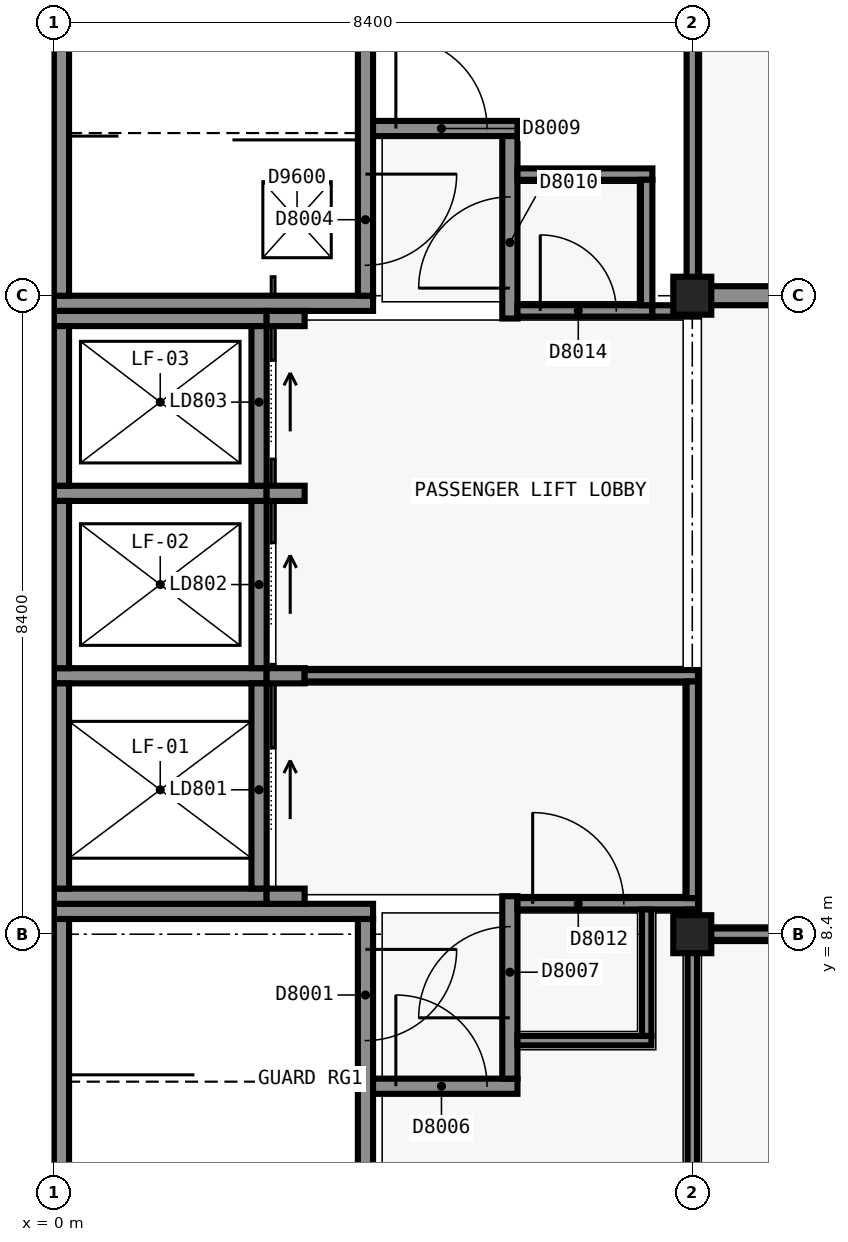
"""IFC4 building model, lengths in metres.
Left out: names, types, materials, properties, quantities, classifications, styles, units other than length and angle.
Written with IfcOpenShell. Run it as: python <this file> out.ifc"""

import sys

from ifc_helpers import new_model, si_unit, direction, frame, frame_2d, origin, origin_2d, place, context, subcontext, project, spatial, rectangle, extrude, element, fill, save


model = new_model("IFC4")
c1 = context("Model", 3, precision=1e-05, world=origin(), true_north=direction((0.0, 1.0)))
c2 = subcontext(c1, "Body", "Model", "MODEL_VIEW")
j1 = project(units=[si_unit("LENGTHUNIT", "METRE"), si_unit("PLANEANGLEUNIT", "RADIAN")], contexts=[c1])
p1 = place(None, origin())
s1 = spatial("IfcSite", under=j1, at=p1, CompositionType="ELEMENT")
p2 = place(p1, origin())
s2 = spatial("IfcBuilding", under=s1, at=p2, CompositionType="ELEMENT")
p3 = place(p2, frame((0.0, 0.0, 38.1)))
s3 = spatial("IfcBuildingStorey", under=s2, at=p3, CompositionType="ELEMENT", Elevation=38.1)
p4 = place(p3, frame((0.0, 8.7, 0.0), z_axis=(0.0, 0.0, 1.0), x_axis=(1.0, 0.0, 0.0)))
e1 = element("IfcWall", 1, at=p4, inside=s3, PredefinedType="SHEAR", context=c2, shape_type="SweptSolid", body=[
    extrude(rectangle(XDim=4.199, YDim=0.2, at=frame_2d((2.1, 0.0))), origin(), (0.0, 0.0, 1.0), 4.5),
])
p5 = place(p3, frame((0.1, 0.2, 0.0), z_axis=(0.0, 0.0, 1.0), x_axis=(0.0, 1.0, 0.0)))
e2 = element("IfcWall", 2, at=p5, inside=s3, PredefinedType="SHEAR", context=c2, shape_type="SweptSolid", body=[
    extrude(rectangle(XDim=8.4, YDim=0.2, at=frame_2d((4.2, 0.0))), origin(), (0.0, 0.0, 1.0), 4.5),
])
p6 = place(p3, frame((4.1, 8.6, 0.0), z_axis=(0.0, 0.0, 1.0), x_axis=(0.0, -1.0, 0.0)))
e3 = element("IfcWall", 3, at=p6, inside=s3, PredefinedType="SHEAR", context=c2, shape_type="SweptSolid", body=[
    extrude(rectangle(XDim=8.4, YDim=0.2, at=frame_2d((4.2, 0.0))), origin(), (0.0, 0.0, 1.0), 4.5),
])
p7 = place(p6, frame((0.4, 0.0, 0.0)))
e4 = element("IfcOpeningElement", 4, at=p7, cuts=e3, PredefinedType="OPENING", context=c2, shape_type="SweptSolid", body=[
    extrude(rectangle(XDim=1.2, YDim=2.1, at=frame_2d((0.6, 1.05))), frame((0.0, 0.11, 0.0), z_axis=(0.0, -1.0, 0.0), x_axis=(1.0, 0.0, 0.0)), (0.0, 0.0, 1.0), 0.22),
])
p8 = place(p3, frame((4.2, 16.7, 0.0), z_axis=(0.0, 0.0, 1.0), x_axis=(-1.0, 0.0, 0.0)))
e5 = element("IfcWall", 5, at=p8, inside=s3, PredefinedType="SHEAR", context=c2, shape_type="SweptSolid", body=[
    extrude(rectangle(XDim=4.199, YDim=0.2, at=frame_2d((2.1, 0.0))), origin(), (0.0, 0.0, 1.0), 4.5),
])
p9 = place(p3, frame((0.1, 16.8, 0.0), z_axis=(0.0, 0.0, 1.0), x_axis=(0.0, 1.0, 0.0)))
e6 = element("IfcWall", 6, at=p9, inside=s3, PredefinedType="SHEAR", context=c2, shape_type="SweptSolid", body=[
    extrude(rectangle(XDim=8.2, YDim=0.2, at=frame_2d((4.1, 0.0))), origin(), (0.0, 0.0, 1.0), 4.5),
])
p10 = place(p3, frame((4.1, 25.0, 0.0), z_axis=(0.0, 0.0, 1.0), x_axis=(0.0, -1.0, 0.0)))
e7 = element("IfcWall", 7, at=p10, inside=s3, PredefinedType="SHEAR", context=c2, shape_type="SweptSolid", body=[
    extrude(rectangle(XDim=8.2, YDim=0.2, at=frame_2d((4.1, 0.0))), origin(), (0.0, 0.0, 1.0), 4.5),
])
p11 = place(p10, frame((6.6, 0.0, 0.0)))
e8 = element("IfcOpeningElement", 8, at=p11, cuts=e7, PredefinedType="OPENING", context=c2, shape_type="SweptSolid", body=[
    extrude(rectangle(XDim=1.2, YDim=2.1, at=frame_2d((0.6, 1.05))), frame((0.0, 0.11, 0.0), z_axis=(0.0, -1.0, 0.0), x_axis=(1.0, 0.0, 0.0)), (0.0, 0.0, 1.0), 0.22),
])
for number, where, z_axis, x_axis in (
    (9, (2.8, 8.9, 0.0), (0.0, 0.0, 1.0), (-1.0, 0.0, 0.0)),
    (10, (0.0, 11.8, 0.0), (0.0, 0.0, 1.0), (1.0, 0.0, 0.0)),
):
    element("IfcWall", number, at=place(p3, frame(where, z_axis=z_axis, x_axis=x_axis)), inside=s3, PredefinedType="SHEAR", context=c2, shape_type="SweptSolid", body=[
        extrude(rectangle(XDim=2.8, YDim=0.2, at=frame_2d((1.4, 0.0))), origin(), (0.0, 0.0, 1.0), 4.5),
    ])
p12 = place(p3, frame((0.1, 9.0, 0.0), z_axis=(0.0, 0.0, 1.0), x_axis=(0.0, 1.0, 0.0)))
e11 = element("IfcWall", 11, at=p12, inside=s3, PredefinedType="SHEAR", context=c2, shape_type="SweptSolid", body=[
    extrude(rectangle(XDim=2.7, YDim=0.2, at=frame_2d((1.35, 0.0))), origin(), (0.0, 0.0, 1.0), 4.5),
])
p13 = place(p3, frame((2.7, 11.7, 0.0), z_axis=(0.0, 0.0, 1.0), x_axis=(0.0, -1.0, 0.0)))
e12 = element("IfcWall", 12, at=p13, inside=s3, PredefinedType="SHEAR", context=c2, shape_type="SweptSolid", body=[
    extrude(rectangle(XDim=2.7, YDim=0.2, at=frame_2d((1.35, 0.0))), origin(), (0.0, 0.0, 1.0), 4.5),
])
p14 = place(p13, frame((0.85, 0.0, 0.0)))
e13 = element("IfcOpeningElement", 13, at=p14, cuts=e12, PredefinedType="OPENING", context=c2, shape_type="SweptSolid", body=[
    extrude(rectangle(XDim=1.1, YDim=2.1, at=frame_2d((0.55, 1.05))), frame((0.0, 0.11, 0.0), z_axis=(0.0, -1.0, 0.0), x_axis=(1.0, 0.0, 0.0)), (0.0, 0.0, 1.0), 0.22),
])
p15 = place(p3, frame((0.0, 14.2, 0.0), z_axis=(0.0, 0.0, 1.0), x_axis=(1.0, 0.0, 0.0)))
e14 = element("IfcWall", 14, at=p15, inside=s3, PredefinedType="SHEAR", context=c2, shape_type="SweptSolid", body=[
    extrude(rectangle(XDim=2.8, YDim=0.2, at=frame_2d((1.4, 0.0))), origin(), (0.0, 0.0, 1.0), 4.5),
])
p16 = place(p3, frame((0.1, 11.9, 0.0), z_axis=(0.0, 0.0, 1.0), x_axis=(0.0, 1.0, 0.0)))
e15 = element("IfcWall", 15, at=p16, inside=s3, PredefinedType="SHEAR", context=c2, shape_type="SweptSolid", body=[
    extrude(rectangle(XDim=2.2, YDim=0.2, at=frame_2d((1.1, 0.0))), origin(), (0.0, 0.0, 1.0), 4.5),
])
p17 = place(p3, frame((2.7, 14.1, 0.0), z_axis=(0.0, 0.0, 1.0), x_axis=(0.0, -1.0, 0.0)))
e16 = element("IfcWall", 16, at=p17, inside=s3, PredefinedType="SHEAR", context=c2, shape_type="SweptSolid", body=[
    extrude(rectangle(XDim=2.2, YDim=0.2, at=frame_2d((1.1, 0.0))), origin(), (0.0, 0.0, 1.0), 4.5),
])
p18 = place(p17, frame((0.55, 0.0, 0.0)))
e17 = element("IfcOpeningElement", 17, at=p18, cuts=e16, PredefinedType="OPENING", context=c2, shape_type="SweptSolid", body=[
    extrude(rectangle(XDim=1.1, YDim=2.1, at=frame_2d((0.55, 1.05))), frame((0.0, 0.11, 0.0), z_axis=(0.0, -1.0, 0.0), x_axis=(1.0, 0.0, 0.0)), (0.0, 0.0, 1.0), 0.22),
])
p19 = place(p3, frame((0.0, 16.5, 0.0), z_axis=(0.0, 0.0, 1.0), x_axis=(1.0, 0.0, 0.0)))
e18 = element("IfcWall", 18, at=p19, inside=s3, PredefinedType="SHEAR", context=c2, shape_type="SweptSolid", body=[
    extrude(rectangle(XDim=2.8, YDim=0.2, at=frame_2d((1.4, 0.0))), origin(), (0.0, 0.0, 1.0), 4.5),
])
p20 = place(p3, frame((0.1, 14.3, 0.0), z_axis=(0.0, 0.0, 1.0), x_axis=(0.0, 1.0, 0.0)))
e19 = element("IfcWall", 19, at=p20, inside=s3, PredefinedType="SHEAR", context=c2, shape_type="SweptSolid", body=[
    extrude(rectangle(XDim=2.1, YDim=0.2, at=frame_2d((1.05, 0.0))), origin(), (0.0, 0.0, 1.0), 4.5),
])
p21 = place(p3, frame((2.7, 16.4, 0.0), z_axis=(0.0, 0.0, 1.0), x_axis=(0.0, -1.0, 0.0)))
e20 = element("IfcWall", 20, at=p21, inside=s3, PredefinedType="SHEAR", context=c2, shape_type="SweptSolid", body=[
    extrude(rectangle(XDim=2.1, YDim=0.2, at=frame_2d((1.05, 0.0))), origin(), (0.0, 0.0, 1.0), 4.5),
])
p22 = place(p21, frame((0.45, 0.0, 0.0)))
e21 = element("IfcOpeningElement", 21, at=p22, cuts=e20, PredefinedType="OPENING", context=c2, shape_type="SweptSolid", body=[
    extrude(rectangle(XDim=1.1, YDim=2.1, at=frame_2d((0.55, 1.05))), frame((0.0, 0.11, 0.0), z_axis=(0.0, -1.0, 0.0), x_axis=(1.0, 0.0, 0.0)), (0.0, 0.0, 1.0), 0.22),
])
for number, where, z_axis, x_axis in (
    (22, (8.4, 8.4, 0.0), (0.0, 0.0, 1.0), (1.0, 0.0, 0.0)),
    (23, (8.4, 16.8, 0.0), (0.0, 0.0, 1.0), (1.0, 0.0, 0.0)),
):
    element("IfcColumn", number, at=place(p3, frame(where, z_axis=z_axis, x_axis=x_axis)), inside=s3, PredefinedType="COLUMN", context=c2, shape_type="SweptSolid", body=[
        extrude(rectangle(XDim=0.5, YDim=0.5, at=origin_2d()), origin(), (0.0, 0.0, 1.0), 4.5),
    ])
for number, where, z_axis, x_axis in (
    (24, (3.3, 8.9, 0.0), (0.0, 0.0, 1.0), (-1.0, 0.0, 0.0)),
    (25, (2.8, 11.8, 0.0), (0.0, 0.0, 1.0), (1.0, 0.0, 0.0)),
    (26, (2.8, 14.2, 0.0), (0.0, 0.0, 1.0), (1.0, 0.0, 0.0)),
    (27, (2.8, 16.5, 0.0), (0.0, 0.0, 1.0), (1.0, 0.0, 0.0)),
):
    element("IfcWall", number, at=place(p3, frame(where, z_axis=z_axis, x_axis=x_axis)), inside=s3, PredefinedType="SHEAR", context=c2, shape_type="SweptSolid", body=[
        extrude(rectangle(XDim=0.5, YDim=0.2, at=frame_2d((0.25, 0.0))), origin(), (0.0, 0.0, 1.0), 4.5),
    ])
p23 = place(p3, frame((8.275, 16.8, 0.0), z_axis=(0.0, 0.0, 1.0), x_axis=(1.0, 0.0, 0.0)))
e28 = element("IfcWall", 28, at=p23, inside=s3, PredefinedType="PARTITIONING", context=c2, shape_type="SweptSolid", body=[
    extrude(rectangle(XDim=12.85, YDim=0.25, at=frame_2d((6.425, 0.0))), origin(), (0.0, 0.0, 1.0), 3.4),
])
p24 = place(p23, frame((8.925, 0.0, 0.0)))
e29 = element("IfcOpeningElement", 29, at=p24, cuts=e28, PredefinedType="OPENING", context=c2, shape_type="SweptSolid", body=[
    extrude(rectangle(XDim=1.2, YDim=2.1, at=frame_2d((0.6, 1.05))), frame((0.0, 0.135, 0.0), z_axis=(0.0, -1.0, 0.0), x_axis=(1.0, 0.0, 0.0)), (0.0, 0.0, 1.0), 0.27),
])
p25 = place(p3, frame((4.2, 6.4, 0.0), z_axis=(0.0, 0.0, 1.0), x_axis=(1.0, 0.0, 0.0)))
e30 = element("IfcWall", 30, at=p25, inside=s3, PredefinedType="SOLIDWALL", context=c2, shape_type="SweptSolid", body=[
    extrude(rectangle(XDim=1.9, YDim=0.2, at=frame_2d((0.95, 0.0))), origin(), (0.0, 0.0, 1.0), 4.2),
])
p26 = place(p25, frame((0.3, 0.0, 0.0)))
e31 = element("IfcOpeningElement", 31, at=p26, cuts=e30, PredefinedType="OPENING", context=c2, shape_type="SweptSolid", body=[
    extrude(rectangle(XDim=1.2, YDim=2.1, at=frame_2d((0.6, 1.05))), frame((0.0, 0.11, 0.0), z_axis=(0.0, -1.0, 0.0), x_axis=(1.0, 0.0, 0.0)), (0.0, 0.0, 1.0), 0.22),
])
p27 = place(p3, frame((4.2, 19.0, 0.0), z_axis=(0.0, 0.0, 1.0), x_axis=(1.0, 0.0, 0.0)))
e32 = element("IfcWall", 32, at=p27, inside=s3, PredefinedType="SOLIDWALL", context=c2, shape_type="SweptSolid", body=[
    extrude(rectangle(XDim=1.9, YDim=0.2, at=frame_2d((0.95, 0.0))), origin(), (0.0, 0.0, 1.0), 4.2),
])
p28 = place(p27, frame((0.3, 0.0, 0.0)))
e33 = element("IfcOpeningElement", 33, at=p28, cuts=e32, PredefinedType="OPENING", context=c2, shape_type="SweptSolid", body=[
    extrude(rectangle(XDim=1.2, YDim=2.1, at=frame_2d((0.6, 1.05))), frame((0.0, 0.11, 0.0), z_axis=(0.0, -1.0, 0.0), x_axis=(1.0, 0.0, 0.0)), (0.0, 0.0, 1.0), 0.22),
])
p29 = place(p3, frame((6.0, 6.5, 0.0), z_axis=(0.0, 0.0, 1.0), x_axis=(0.0, 1.0, 0.0)))
e34 = element("IfcWall", 34, at=p29, inside=s3, PredefinedType="SOLIDWALL", context=c2, shape_type="SweptSolid", body=[
    extrude(rectangle(XDim=2.4, YDim=0.2, at=frame_2d((1.2, 0.0))), origin(), (0.0, 0.0, 1.0), 3.6),
])
p30 = place(p29, frame((0.8, 0.0, 0.0)))
e35 = element("IfcOpeningElement", 35, at=p30, cuts=e34, PredefinedType="OPENING", context=c2, shape_type="SweptSolid", body=[
    extrude(rectangle(XDim=1.2, YDim=2.1, at=frame_2d((0.6, 1.05))), frame((0.0, 0.11, 0.0), z_axis=(0.0, -1.0, 0.0), x_axis=(1.0, 0.0, 0.0)), (0.0, 0.0, 1.0), 0.22),
])
p31 = place(p3, frame((6.0, 16.5, 0.0), z_axis=(0.0, 0.0, 1.0), x_axis=(0.0, 1.0, 0.0)))
e36 = element("IfcWall", 36, at=p31, inside=s3, PredefinedType="SOLIDWALL", context=c2, shape_type="SweptSolid", body=[
    extrude(rectangle(XDim=2.4, YDim=0.2, at=frame_2d((1.2, 0.0))), origin(), (0.0, 0.0, 1.0), 3.6),
])
p32 = place(p31, frame((0.4, 0.0, 0.0)))
e37 = element("IfcOpeningElement", 37, at=p32, cuts=e36, PredefinedType="OPENING", context=c2, shape_type="SweptSolid", body=[
    extrude(rectangle(XDim=1.2, YDim=2.1, at=frame_2d((0.6, 1.05))), frame((0.0, 0.11, 0.0), z_axis=(0.0, -1.0, 0.0), x_axis=(1.0, 0.0, 0.0)), (0.0, 0.0, 1.0), 0.22),
])
p33 = place(p3, frame((8.325, 8.4, 0.0), z_axis=(0.0, 0.0, 1.0), x_axis=(1.0, 0.0, 0.0)))
e38 = element("IfcWall", 38, at=p33, inside=s3, PredefinedType="PARTITIONING", context=c2, shape_type="SweptSolid", body=[
    extrude(rectangle(XDim=4.35, YDim=0.15, at=frame_2d((2.175, 0.0))), origin(), (0.0, 0.0, 1.0), 3.4),
])
p34 = place(p3, frame((6.1, 16.6, 0.0), z_axis=(0.0, 0.0, 1.0), x_axis=(1.0, 0.0, 0.0)))
e39 = element("IfcWall", 39, at=p34, inside=s3, PredefinedType="PARTITIONING", context=c2, shape_type="SweptSolid", body=[
    extrude(rectangle(XDim=1.775, YDim=0.15, at=frame_2d((0.887, 0.0))), origin(), (0.0, 0.0, 1.0), 3.6),
])
p35 = place(p34, frame((0.3, 0.0, 0.0)))
e40 = element("IfcOpeningElement", 40, at=p35, cuts=e39, PredefinedType="OPENING", context=c2, shape_type="SweptSolid", body=[
    extrude(rectangle(XDim=1.0, YDim=2.1, at=frame_2d((0.5, 1.05))), frame((0.0, 0.085, 0.0), z_axis=(0.0, -1.0, 0.0), x_axis=(1.0, 0.0, 0.0)), (0.0, 0.0, 1.0), 0.17),
])
p36 = place(p3, frame((6.1, 8.8, 0.0), z_axis=(0.0, 0.0, 1.0), x_axis=(1.0, 0.0, 0.0)))
e41 = element("IfcWall", 41, at=p36, inside=s3, PredefinedType="SOLIDWALL", context=c2, shape_type="SweptSolid", body=[
    extrude(rectangle(XDim=2.375, YDim=0.15, at=frame_2d((1.188, 0.0))), origin(), (0.0, 0.0, 1.0), 3.4),
])
p37 = place(p36, frame((0.2, 0.0, 0.0)))
e42 = element("IfcOpeningElement", 42, at=p37, cuts=e41, PredefinedType="OPENING", context=c2, shape_type="SweptSolid", body=[
    extrude(rectangle(XDim=1.2, YDim=2.1, at=frame_2d((0.6, 1.05))), frame((0.0, 0.085, 0.0), z_axis=(0.0, -1.0, 0.0), x_axis=(1.0, 0.0, 0.0)), (0.0, 0.0, 1.0), 0.17),
])
p38 = place(p3, frame((3.3, 11.8, 0.0), z_axis=(0.0, 0.0, 1.0), x_axis=(1.0, 0.0, 0.0)))
e43 = element("IfcWall", 43, at=p38, inside=s3, PredefinedType="SOLIDWALL", context=c2, shape_type="SweptSolid", body=[
    extrude(rectangle(XDim=5.175, YDim=0.15, at=frame_2d((2.587, 0.0))), origin(), (0.0, 0.0, 1.0), 3.4),
])
p39 = place(p3, frame((7.875, 16.6, 0.0), z_axis=(0.0, 0.0, 1.0), x_axis=(1.0, 0.0, 0.0)))
e44 = element("IfcWall", 44, at=p39, inside=s3, PredefinedType="SOLIDWALL", context=c2, shape_type="SweptSolid", body=[
    extrude(rectangle(XDim=0.6, YDim=0.15, at=frame_2d((0.3, 0.0))), origin(), (0.0, 0.0, 1.0), 3.4),
])
p40 = place(p3, frame((6.1, 18.4, 0.0), z_axis=(0.0, 0.0, 1.0), x_axis=(1.0, 0.0, 0.0)))
e45 = element("IfcWall", 45, at=p40, inside=s3, PredefinedType="SOLIDWALL", context=c2, shape_type="SweptSolid", body=[
    extrude(rectangle(XDim=1.775, YDim=0.15, at=frame_2d((0.887, 0.0))), origin(), (0.0, 0.0, 1.0), 4.2),
])
p41 = place(p3, frame((8.4, 8.475, 0.0), z_axis=(0.0, 0.0, 1.0), x_axis=(0.0, 1.0, 0.0)))
e46 = element("IfcWall", 46, at=p41, inside=s3, PredefinedType="PARTITIONING", context=c2, shape_type="SweptSolid", body=[
    extrude(rectangle(XDim=0.25, YDim=0.15, at=frame_2d((0.125, 0.0))), origin(), (0.0, 0.0, 1.0), 3.4),
])
p42 = place(p3, frame((8.4, 8.875, 0.0), z_axis=(0.0, 0.0, 1.0), x_axis=(0.0, 1.0, 0.0)))
e47 = element("IfcWall", 47, at=p42, inside=s3, PredefinedType="SOLIDWALL", context=c2, shape_type="SweptSolid", body=[
    extrude(rectangle(XDim=2.85, YDim=0.15, at=frame_2d((1.425, 0.0))), origin(), (0.0, 0.0, 1.0), 3.4),
])
p43 = place(p3, frame((7.8, 16.675, 0.0), z_axis=(0.0, 0.0, 1.0), x_axis=(0.0, 1.0, 0.0)))
e48 = element("IfcWall", 48, at=p43, inside=s3, PredefinedType="SOLIDWALL", context=c2, shape_type="SweptSolid", body=[
    extrude(rectangle(XDim=1.65, YDim=0.15, at=frame_2d((0.825, 0.0))), origin(), (0.0, 0.0, 1.0), 3.6),
])
p44 = place(p3, frame((8.4, 16.925, 0.0), z_axis=(0.0, 0.0, 1.0), x_axis=(0.0, 1.0, 0.0)))
e49 = element("IfcWall", 49, at=p44, inside=s3, PredefinedType="SOLIDWALL", context=c2, shape_type="SweptSolid", body=[
    extrude(rectangle(XDim=7.525, YDim=0.15, at=frame_2d((3.762, 0.0))), origin(), (0.0, 0.0, 1.0), 3.4),
])
p45 = place(p3, frame((6.1, 7.0, 0.0), z_axis=(0.0, 0.0, 1.0), x_axis=(1.0, 0.0, 0.0)))
e50 = element("IfcWall", 50, at=p45, inside=s3, PredefinedType="PARTITIONING", context=c2, shape_type="SweptSolid", body=[
    extrude(rectangle(XDim=1.762, YDim=0.125, at=frame_2d((0.881, 0.0))), origin(), (0.0, 0.0, 1.0), 4.2),
])
p46 = place(p3, frame((7.8, 7.062, 0.0), z_axis=(0.0, 0.0, 1.0), x_axis=(0.0, 1.0, 0.0)))
e51 = element("IfcWall", 51, at=p46, inside=s3, PredefinedType="PARTITIONING", context=c2, shape_type="SweptSolid", body=[
    extrude(rectangle(XDim=1.663, YDim=0.125, at=frame_2d((0.831, 0.0))), origin(), (0.0, 0.0, 1.0), 3.6),
])
p47 = place(p3, frame((8.4, 0.75, 0.0), z_axis=(0.0, 0.0, 1.0), x_axis=(0.0, 1.0, 0.0)))
e52 = element("IfcWall", 52, at=p47, inside=s3, PredefinedType="PARTITIONING", context=c2, shape_type="SweptSolid", body=[
    extrude(rectangle(XDim=7.575, YDim=0.125, at=frame_2d((3.788, 0.0))), origin(), (0.0, 0.0, 1.0), 3.4),
])
p48 = place(p2, frame((0.0, 0.0, 42.6)))
p49 = place(p48, frame((0.0, 0.0, -0.4)))
p50 = place(p49, frame((3.2, 17.8, 0.0)))
p51 = place(p50, frame((0.0, 0.0, 0.35)))
e53 = element("IfcDoor", 53, at=p51, inside=s3, OperationType="SINGLE_SWING_LEFT", PredefinedType="TRAPDOOR", context=c2, shape_type="SweptSolid", body=[
    extrude(rectangle(XDim=0.9, YDim=1.0, at=origin_2d()), origin(), (0.0, 0.0, 1.0), 0.05),
])
p52 = place(p14, origin())
e54 = element("IfcDoor", 54, at=p52, inside=s3, OperationType="SLIDING_TO_LEFT", PredefinedType="DOOR", context=c2, shape_type="SweptSolid", body=[
    extrude(rectangle(XDim=1.1, YDim=2.1, at=frame_2d((0.55, 1.05))), frame((0.0, 0.025, 0.0), z_axis=(0.0, -1.0, 0.0), x_axis=(1.0, 0.0, 0.0)), (0.0, 0.0, 1.0), 0.05),
])
fill(e13, e54)
p53 = place(p18, origin())
e55 = element("IfcDoor", 55, at=p53, inside=s3, OperationType="SLIDING_TO_LEFT", PredefinedType="DOOR", context=c2, shape_type="SweptSolid", body=[
    extrude(rectangle(XDim=1.1, YDim=2.1, at=frame_2d((0.55, 1.05))), frame((0.0, 0.025, 0.0), z_axis=(0.0, -1.0, 0.0), x_axis=(1.0, 0.0, 0.0)), (0.0, 0.0, 1.0), 0.05),
])
fill(e17, e55)
p54 = place(p22, origin())
e56 = element("IfcDoor", 56, at=p54, inside=s3, OperationType="SLIDING_TO_LEFT", PredefinedType="DOOR", context=c2, shape_type="SweptSolid", body=[
    extrude(rectangle(XDim=1.1, YDim=2.1, at=frame_2d((0.55, 1.05))), frame((0.0, 0.025, 0.0), z_axis=(0.0, -1.0, 0.0), x_axis=(1.0, 0.0, 0.0)), (0.0, 0.0, 1.0), 0.05),
])
fill(e21, e56)
p55 = place(p7, origin())
e57 = element("IfcDoor", 57, at=p55, inside=s3, OperationType="SINGLE_SWING_RIGHT", PredefinedType="DOOR", context=c2, shape_type="SweptSolid", body=[
    extrude(rectangle(XDim=1.2, YDim=2.1, at=frame_2d((0.6, 1.05))), frame((0.0, 0.025, 0.0), z_axis=(0.0, -1.0, 0.0), x_axis=(1.0, 0.0, 0.0)), (0.0, 0.0, 1.0), 0.05),
])
fill(e4, e57)
p56 = place(p11, origin())
e58 = element("IfcDoor", 58, at=p56, inside=s3, OperationType="SINGLE_SWING_RIGHT", PredefinedType="DOOR", context=c2, shape_type="SweptSolid", body=[
    extrude(rectangle(XDim=1.2, YDim=2.1, at=frame_2d((0.6, 1.05))), frame((0.0, 0.025, 0.0), z_axis=(0.0, -1.0, 0.0), x_axis=(1.0, 0.0, 0.0)), (0.0, 0.0, 1.0), 0.05),
])
fill(e8, e58)
p57 = place(p26, origin())
e59 = element("IfcDoor", 59, at=p57, inside=s3, OperationType="SINGLE_SWING_LEFT", PredefinedType="DOOR", context=c2, shape_type="SweptSolid", body=[
    extrude(rectangle(XDim=1.2, YDim=2.1, at=frame_2d((0.6, 1.05))), frame((0.0, 0.025, 0.0), z_axis=(0.0, -1.0, 0.0), x_axis=(1.0, 0.0, 0.0)), (0.0, 0.0, 1.0), 0.05),
])
fill(e31, e59)
p58 = place(p30, origin())
e60 = element("IfcDoor", 60, at=p58, inside=s3, OperationType="SINGLE_SWING_RIGHT", PredefinedType="DOOR", context=c2, shape_type="SweptSolid", body=[
    extrude(rectangle(XDim=1.2, YDim=2.1, at=frame_2d((0.6, 1.05))), frame((0.0, 0.025, 0.0), z_axis=(0.0, -1.0, 0.0), x_axis=(1.0, 0.0, 0.0)), (0.0, 0.0, 1.0), 0.05),
])
fill(e35, e60)
p59 = place(p28, origin())
e61 = element("IfcDoor", 61, at=p59, inside=s3, OperationType="SINGLE_SWING_LEFT", PredefinedType="DOOR", context=c2, shape_type="SweptSolid", body=[
    extrude(rectangle(XDim=1.2, YDim=2.1, at=frame_2d((0.6, 1.05))), frame((0.0, 0.025, 0.0), z_axis=(0.0, -1.0, 0.0), x_axis=(1.0, 0.0, 0.0)), (0.0, 0.0, 1.0), 0.05),
])
fill(e33, e61)
p60 = place(p32, origin())
e62 = element("IfcDoor", 62, at=p60, inside=s3, OperationType="SINGLE_SWING_RIGHT", PredefinedType="DOOR", context=c2, shape_type="SweptSolid", body=[
    extrude(rectangle(XDim=1.2, YDim=2.1, at=frame_2d((0.6, 1.05))), frame((0.0, 0.025, 0.0), z_axis=(0.0, -1.0, 0.0), x_axis=(1.0, 0.0, 0.0)), (0.0, 0.0, 1.0), 0.05),
])
fill(e37, e62)
p61 = place(p37, origin())
e63 = element("IfcDoor", 63, at=p61, inside=s3, OperationType="SINGLE_SWING_RIGHT", PredefinedType="DOOR", context=c2, shape_type="SweptSolid", body=[
    extrude(rectangle(XDim=1.2, YDim=2.1, at=frame_2d((0.6, 1.05))), frame((0.0, 0.025, 0.0), z_axis=(0.0, -1.0, 0.0), x_axis=(1.0, 0.0, 0.0)), (0.0, 0.0, 1.0), 0.05),
])
fill(e42, e63)
p62 = place(p35, origin())
e64 = element("IfcDoor", 64, at=p62, inside=s3, OperationType="SINGLE_SWING_RIGHT", PredefinedType="DOOR", context=c2, shape_type="SweptSolid", body=[
    extrude(rectangle(XDim=1.0, YDim=2.1, at=frame_2d((0.5, 1.05))), frame((0.0, 0.025, 0.0), z_axis=(0.0, -1.0, 0.0), x_axis=(1.0, 0.0, 0.0)), (0.0, 0.0, 1.0), 0.05),
])
fill(e40, e64)
save(model, sys.argv[1])
